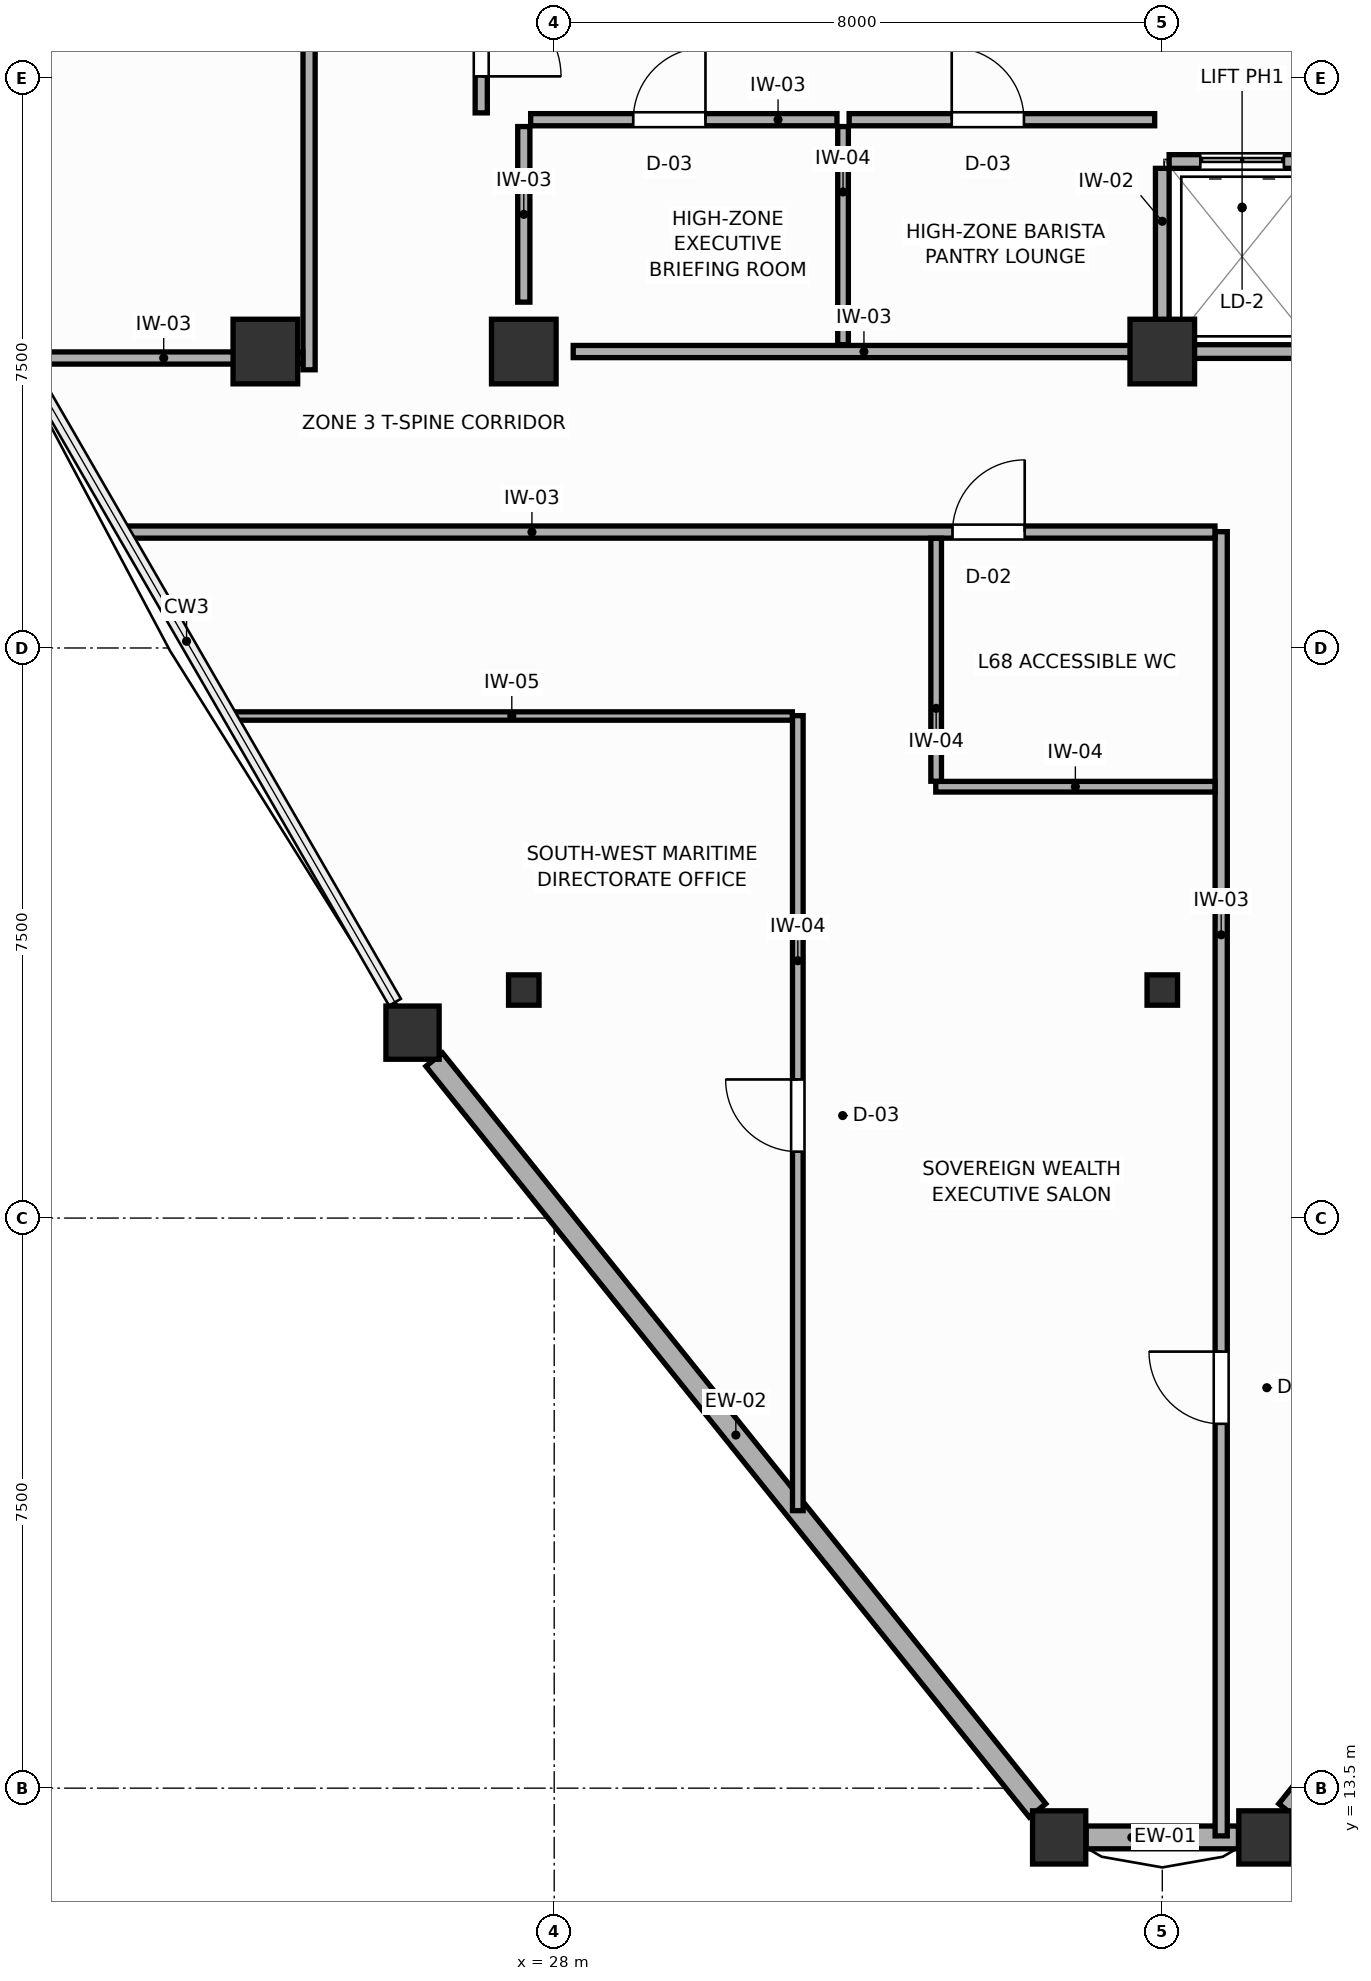
"""IFC4 building model, lengths in metres.
Left out: names, types, materials, properties, quantities, classifications, styles, units other than length and angle.
Written with IfcOpenShell. Run it as: python <this file> out.ifc"""

import sys

from ifc_helpers import new_model, si_unit, direction, frame, frame_2d, origin, origin_2d, place, context, subcontext, project, spatial, rectangle, i_section, extrude, source, transform, mapped, element, fill, save


model = new_model("IFC4")
c1 = context("Model", 3, precision=1e-05, world=origin(), true_north=direction((0.0, 1.0)))
c2 = subcontext(c1, "Body", "Model", "MODEL_VIEW")
j1 = project(units=[si_unit("LENGTHUNIT", "METRE"), si_unit("PLANEANGLEUNIT", "RADIAN")], contexts=[c1])
p1 = place(None, origin())
s1 = spatial("IfcSite", under=j1, at=p1, CompositionType="ELEMENT")
p2 = place(p1, origin())
s2 = spatial("IfcBuilding", under=s1, at=p2, CompositionType="ELEMENT")
p3 = place(p2, frame((0.0, 0.0, 261.0)))
s3 = spatial("IfcBuildingStorey", under=s2, at=p3, CompositionType="ELEMENT", Elevation=261.0)
m1 = source(origin(), c2, "Body", "SweptSolid", [
    extrude(rectangle(XDim=0.85, YDim=0.85, at=origin_2d()), origin(), (0.0, 0.0, 1.0), 3.6),
])
for number, where, z_axis, x_axis in (
    (1, (27.6, 32.4, 0.0), (0.0, 0.0, 1.0), (1.0, 0.0, 0.0)),
    (2, (36.0, 32.4, 0.0), (0.0, 0.0, 1.0), (1.0, 0.0, 0.0)),
    (3, (24.2, 32.4, 0.0), (0.0, 0.0, 1.0), (1.0, 0.0, 0.0)),
):
    element("IfcColumn", number, at=place(p3, frame(where, z_axis=z_axis, x_axis=x_axis)), inside=s3, PredefinedType="COLUMN", context=c2, shape_type="MappedRepresentation", body=[
        mapped(m1, transform((0.0, 0.0, 0.0), scale=1.0)),
    ])
m2 = source(origin(), c2, "Body", "SweptSolid", [
    extrude(i_section(OverallWidth=0.401, OverallDepth=0.399, WebThickness=0.022, FlangeThickness=0.036, FilletRadius=0.015, at=origin_2d()), origin(), (0.0, 0.0, 1.0), 3.6),
])
for number, where, z_axis, x_axis in (
    (4, (27.6, 24.0, 0.0), (0.0, 0.0, 1.0), (1.0, 0.0, 0.0)),
    (5, (36.0, 24.0, 0.0), (0.0, 0.0, 1.0), (1.0, 0.0, 0.0)),
):
    element("IfcColumn", number, at=place(p3, frame(where, z_axis=z_axis, x_axis=x_axis)), inside=s3, PredefinedType="COLUMN", context=c2, shape_type="MappedRepresentation", body=[
        mapped(m2, transform((0.0, 0.0, 0.0), scale=1.0)),
    ])
m3 = source(origin(), c2, "Body", "SweptSolid", [
    extrude(rectangle(XDim=0.7, YDim=0.7, at=origin_2d()), origin(), (0.0, 0.0, 1.0), 3.6),
])
for number, where, z_axis, x_axis in (
    (6, (26.136, 23.439, 0.0), (0.0, 0.0, 1.0), (1.0, 0.0, 0.0)),
    (7, (34.643, 12.852, 0.0), (0.0, 0.0, 1.0), (1.0, 0.0, 0.0)),
    (8, (37.357, 12.852, 0.0), (0.0, 0.0, 1.0), (1.0, 0.0, 0.0)),
):
    element("IfcColumn", number, at=place(p3, frame(where, z_axis=z_axis, x_axis=x_axis)), inside=s3, PredefinedType="COLUMN", context=c2, shape_type="MappedRepresentation", body=[
        mapped(m3, transform((0.0, 0.0, 0.0), scale=1.0)),
    ])
p4 = place(p3, frame((26.421, 23.084, 0.0), z_axis=(0.0, 0.0, 1.0), x_axis=(0.626371247501, -0.77952489396, 0.0)))
e9 = element("IfcWall", 9, at=p4, inside=s3, PredefinedType="SOLIDWALL", context=c2, shape_type="SweptSolid", body=[
    extrude(rectangle(XDim=12.671, YDim=0.28, at=frame_2d((6.336, 0.0))), origin(), (0.0, 0.0, 1.0), 1.88),
])
p5 = place(p3, frame((34.998, 12.852, 0.0), z_axis=(0.0, 0.0, 1.0), x_axis=(1.0, 0.0, 0.0)))
e10 = element("IfcWall", 10, at=p5, inside=s3, PredefinedType="SOLIDWALL", context=c2, shape_type="SweptSolid", body=[
    extrude(rectangle(XDim=2.003, YDim=0.3, at=frame_2d((1.002, 0.0))), origin(), (0.0, 0.0, 1.0), 1.88),
])
p6 = place(p3, frame((37.642, 13.207, 0.0), z_axis=(0.0, 0.0, 1.0), x_axis=(0.626371247501, 0.77952489396, 0.0)))
e11 = element("IfcWall", 11, at=p6, inside=s3, PredefinedType="SOLIDWALL", context=c2, shape_type="SweptSolid", body=[
    extrude(rectangle(XDim=12.671, YDim=0.28, at=frame_2d((6.336, 0.0))), origin(), (0.0, 0.0, 1.0), 1.88),
])
p7 = place(p3, frame((36.09, 34.9, 0.0), z_axis=(0.0, 0.0, 1.0), x_axis=(1.0, 0.0, 0.0)))
e12 = element("IfcWall", 12, at=p7, inside=s3, PredefinedType="PARTITIONING", context=c2, shape_type="SweptSolid", body=[
    extrude(rectangle(XDim=1.92, YDim=0.18, at=frame_2d((0.96, 0.0))), origin(), (0.0, 0.0, 1.0), 3.41),
])
p8 = place(p7, frame((0.41, 0.0, 0.0)))
e13 = element("IfcOpeningElement", 13, at=p8, cuts=e12, PredefinedType="OPENING", context=c2, shape_type="SweptSolid", body=[
    extrude(rectangle(XDim=1.1, YDim=2.1, at=frame_2d((0.55, 1.05))), frame((0.0, 0.1, 0.0), z_axis=(0.0, -1.0, 0.0), x_axis=(1.0, 0.0, 0.0)), (0.0, 0.0, 1.0), 0.2),
])
p9 = place(p3, frame((36.09, 32.4, 0.0), z_axis=(0.0, 0.0, 1.0), x_axis=(1.0, 0.0, 0.0)))
e14 = element("IfcWall", 14, at=p9, inside=s3, PredefinedType="PARTITIONING", context=c2, shape_type="SweptSolid", body=[
    extrude(rectangle(XDim=1.92, YDim=0.18, at=frame_2d((0.96, 0.0))), origin(), (0.0, 0.0, 1.0), 2.17),
])
p10 = place(p3, frame((36.0, 32.49, 0.0), z_axis=(0.0, 0.0, 1.0), x_axis=(0.0, 1.0, 0.0)))
e15 = element("IfcWall", 15, at=p10, inside=s3, PredefinedType="PARTITIONING", context=c2, shape_type="SweptSolid", body=[
    extrude(rectangle(XDim=2.32, YDim=0.18, at=frame_2d((1.16, 0.0))), origin(), (0.0, 0.0, 1.0), 3.41),
])
p11 = place(p3, frame((28.25, 32.4, 0.0), z_axis=(0.0, 0.0, 1.0), x_axis=(1.0, 0.0, 0.0)))
e16 = element("IfcWall", 16, at=p11, inside=s3, PredefinedType="PARTITIONING", context=c2, shape_type="SweptSolid", body=[
    extrude(rectangle(XDim=7.65, YDim=0.16, at=frame_2d((3.825, 0.0))), origin(), (0.0, 0.0, 1.0), 2.17),
])
p12 = place(p3, frame((27.6, 33.05, 0.0), z_axis=(0.0, 0.0, 1.0), x_axis=(0.0, 1.0, 0.0)))
e17 = element("IfcWall", 17, at=p12, inside=s3, PredefinedType="PARTITIONING", context=c2, shape_type="SweptSolid", body=[
    extrude(rectangle(XDim=2.31, YDim=0.16, at=frame_2d((1.155, 0.0))), origin(), (0.0, 0.0, 1.0), 3.41),
])
p13 = place(p3, frame((31.8, 32.49, 0.0), z_axis=(0.0, 0.0, 1.0), x_axis=(0.0, 1.0, 0.0)))
e18 = element("IfcWall", 18, at=p13, inside=s3, PredefinedType="PARTITIONING", context=c2, shape_type="SweptSolid", body=[
    extrude(rectangle(XDim=2.87, YDim=0.14, at=frame_2d((1.435, 0.0))), origin(), (0.0, 0.0, 1.0), 3.41),
])
p14 = place(p3, frame((27.69, 35.45, 0.0), z_axis=(0.0, 0.0, 1.0), x_axis=(1.0, 0.0, 0.0)))
e19 = element("IfcWall", 19, at=p14, inside=s3, PredefinedType="PARTITIONING", context=c2, shape_type="SweptSolid", body=[
    extrude(rectangle(XDim=4.03, YDim=0.16, at=frame_2d((2.015, 0.0))), origin(), (0.0, 0.0, 1.0), 3.41),
])
p15 = place(p14, frame((1.35, 0.0, 0.0)))
e20 = element("IfcOpeningElement", 20, at=p15, cuts=e19, PredefinedType="OPENING", context=c2, shape_type="SweptSolid", body=[
    extrude(rectangle(XDim=0.95, YDim=2.05, at=frame_2d((0.475, 1.025))), frame((0.0, 0.09, 0.0), z_axis=(0.0, -1.0, 0.0), x_axis=(1.0, 0.0, 0.0)), (0.0, 0.0, 1.0), 0.18),
])
p16 = place(p3, frame((31.88, 35.45, 0.0), z_axis=(0.0, 0.0, 1.0), x_axis=(1.0, 0.0, 0.0)))
e21 = element("IfcWall", 21, at=p16, inside=s3, PredefinedType="PARTITIONING", context=c2, shape_type="SweptSolid", body=[
    extrude(rectangle(XDim=4.02, YDim=0.16, at=frame_2d((2.01, 0.0))), origin(), (0.0, 0.0, 1.0), 3.41),
])
p17 = place(p16, frame((1.35, 0.0, 0.0)))
e22 = element("IfcOpeningElement", 22, at=p17, cuts=e21, PredefinedType="OPENING", context=c2, shape_type="SweptSolid", body=[
    extrude(rectangle(XDim=0.95, YDim=2.05, at=frame_2d((0.475, 1.025))), frame((0.0, 0.09, 0.0), z_axis=(0.0, -1.0, 0.0), x_axis=(1.0, 0.0, 0.0)), (0.0, 0.0, 1.0), 0.18),
])
p18 = place(p3, frame((27.04, 35.54, 0.0), z_axis=(0.0, 0.0, 1.0), x_axis=(0.0, 1.0, 0.0)))
e23 = element("IfcWall", 23, at=p18, inside=s3, PredefinedType="PARTITIONING", context=c2, shape_type="SweptSolid", body=[
    extrude(rectangle(XDim=2.11, YDim=0.16, at=frame_2d((1.055, 0.0))), origin(), (0.0, 0.0, 1.0), 3.41),
])
p19 = place(p18, frame((0.48, 0.0, 0.0)))
e24 = element("IfcOpeningElement", 24, at=p19, cuts=e23, PredefinedType="OPENING", context=c2, shape_type="SweptSolid", body=[
    extrude(rectangle(XDim=1.05, YDim=2.1, at=frame_2d((0.525, 1.05))), frame((0.0, 0.09, 0.0), z_axis=(0.0, -1.0, 0.0), x_axis=(1.0, 0.0, 0.0)), (0.0, 0.0, 1.0), 0.18),
])
p20 = place(p3, frame((24.775, 32.16, 0.0), z_axis=(0.0, 0.0, 1.0), x_axis=(0.0, 1.0, 0.0)))
e25 = element("IfcWall", 25, at=p20, inside=s3, PredefinedType="PARTITIONING", context=c2, shape_type="SweptSolid", body=[
    extrude(rectangle(XDim=17.827, YDim=0.16, at=frame_2d((8.914, 0.0))), origin(), (0.0, 0.0, 1.0), 3.41),
])
p21 = place(p20, frame((8.33, 0.0, 0.0)))
e26 = element("IfcOpeningElement", 26, at=p21, cuts=e25, PredefinedType="OPENING", context=c2, shape_type="SweptSolid", body=[
    extrude(rectangle(XDim=0.95, YDim=2.05, at=frame_2d((0.475, 1.025))), frame((0.0, 0.09, 0.0), z_axis=(0.0, -1.0, 0.0), x_axis=(1.0, 0.0, 0.0)), (0.0, 0.0, 1.0), 0.18),
])
p22 = place(p3, frame((36.775, 12.872, 0.0), z_axis=(0.0, 0.0, 1.0), x_axis=(0.0, 1.0, 0.0)))
e27 = element("IfcWall", 27, at=p22, inside=s3, PredefinedType="PARTITIONING", context=c2, shape_type="SweptSolid", body=[
    extrude(rectangle(XDim=17.158, YDim=0.16, at=frame_2d((8.579, 0.0))), origin(), (0.0, 0.0, 1.0), 3.41),
])
p23 = place(p22, frame((5.421, 0.0, 0.0)))
e28 = element("IfcOpeningElement", 28, at=p23, cuts=e27, PredefinedType="OPENING", context=c2, shape_type="SweptSolid", body=[
    extrude(rectangle(XDim=0.95, YDim=2.05, at=frame_2d((0.475, 1.025))), frame((0.0, 0.09, 0.0), z_axis=(0.0, -1.0, 0.0), x_axis=(1.0, 0.0, 0.0)), (0.0, 0.0, 1.0), 0.18),
])
p24 = place(p3, frame((22.354, 30.025, 0.0), z_axis=(0.0, 0.0, 1.0), x_axis=(1.0, 0.0, 0.0)))
e29 = element("IfcWall", 29, at=p24, inside=s3, PredefinedType="PARTITIONING", context=c2, shape_type="SweptSolid", body=[
    extrude(rectangle(XDim=14.339, YDim=0.16, at=frame_2d((7.169, 0.0))), origin(), (0.0, 0.0, 1.0), 3.41),
])
p25 = place(p24, frame((10.886, 0.0, 0.0)))
e30 = element("IfcOpeningElement", 30, at=p25, cuts=e29, PredefinedType="OPENING", context=c2, shape_type="SweptSolid", body=[
    extrude(rectangle(XDim=0.95, YDim=2.05, at=frame_2d((0.475, 1.025))), frame((0.0, 0.09, 0.0), z_axis=(0.0, -1.0, 0.0), x_axis=(1.0, 0.0, 0.0)), (0.0, 0.0, 1.0), 0.18),
])
p26 = place(p3, frame((21.032, 32.315, 0.0), z_axis=(0.0, 0.0, 1.0), x_axis=(1.0, 0.0, 0.0)))
e31 = element("IfcWall", 31, at=p26, inside=s3, PredefinedType="PARTITIONING", context=c2, shape_type="SweptSolid", body=[
    extrude(rectangle(XDim=3.661, YDim=0.16, at=frame_2d((1.831, 0.0))), origin(), (0.0, 0.0, 1.0), 2.17),
])
p27 = place(p3, frame((31.205, 17.151, 0.0), z_axis=(0.0, 0.0, 1.0), x_axis=(0.0, 1.0, 0.0)))
e32 = element("IfcWall", 32, at=p27, inside=s3, PredefinedType="PARTITIONING", context=c2, shape_type="SweptSolid", body=[
    extrude(rectangle(XDim=10.459, YDim=0.14, at=frame_2d((5.229, 0.0))), origin(), (0.0, 0.0, 1.0), 3.41),
])
p28 = place(p27, frame((4.723, 0.0, 0.0)))
e33 = element("IfcOpeningElement", 33, at=p28, cuts=e32, PredefinedType="OPENING", context=c2, shape_type="SweptSolid", body=[
    extrude(rectangle(XDim=0.95, YDim=2.05, at=frame_2d((0.475, 1.025))), frame((0.0, 0.08, 0.0), z_axis=(0.0, -1.0, 0.0), x_axis=(1.0, 0.0, 0.0)), (0.0, 0.0, 1.0), 0.16),
])
p29 = place(p3, frame((23.751, 27.605, 0.0), z_axis=(0.0, 0.0, 1.0), x_axis=(1.0, 0.0, 0.0)))
e34 = element("IfcWall", 34, at=p29, inside=s3, PredefinedType="MOVABLE", context=c2, shape_type="SweptSolid", body=[
    extrude(rectangle(XDim=7.382, YDim=0.11, at=frame_2d((3.691, 0.0))), origin(), (0.0, 0.0, 1.0), 3.41),
])
p30 = place(p3, frame((33.02, 26.675, 0.0), z_axis=(0.0, 0.0, 1.0), x_axis=(1.0, 0.0, 0.0)))
e35 = element("IfcWall", 35, at=p30, inside=s3, PredefinedType="PARTITIONING", context=c2, shape_type="SweptSolid", body=[
    extrude(rectangle(XDim=3.673, YDim=0.14, at=frame_2d((1.836, 0.0))), origin(), (0.0, 0.0, 1.0), 3.41),
])
p31 = place(p3, frame((33.025, 26.747, 0.0), z_axis=(0.0, 0.0, 1.0), x_axis=(0.0, 1.0, 0.0)))
e36 = element("IfcWall", 36, at=p31, inside=s3, PredefinedType="PARTITIONING", context=c2, shape_type="SweptSolid", body=[
    extrude(rectangle(XDim=3.196, YDim=0.14, at=frame_2d((1.598, 0.0))), origin(), (0.0, 0.0, 1.0), 3.41),
])
p32 = place(p8, origin())
e37 = element("IfcDoor", 37, at=p32, inside=s3, OperationType="DOUBLE_DOOR_SLIDING", PredefinedType="DOOR", context=c2, shape_type="SweptSolid", body=[
    extrude(rectangle(XDim=1.1, YDim=2.1, at=frame_2d((0.55, 1.05))), frame((0.0, 0.025, 0.0), z_axis=(0.0, -1.0, 0.0), x_axis=(1.0, 0.0, 0.0)), (0.0, 0.0, 1.0), 0.05),
])
fill(e13, e37)
p33 = place(p15, origin())
e38 = element("IfcDoor", 38, at=p33, inside=s3, OperationType="SINGLE_SWING_RIGHT", PredefinedType="DOOR", context=c2, shape_type="SweptSolid", body=[
    extrude(rectangle(XDim=0.95, YDim=2.05, at=frame_2d((0.475, 1.025))), frame((0.0, 0.025, 0.0), z_axis=(0.0, -1.0, 0.0), x_axis=(1.0, 0.0, 0.0)), (0.0, 0.0, 1.0), 0.05),
])
fill(e20, e38)
p34 = place(p17, origin())
e39 = element("IfcDoor", 39, at=p34, inside=s3, OperationType="SINGLE_SWING_LEFT", PredefinedType="DOOR", context=c2, shape_type="SweptSolid", body=[
    extrude(rectangle(XDim=0.95, YDim=2.05, at=frame_2d((0.475, 1.025))), frame((0.0, 0.025, 0.0), z_axis=(0.0, -1.0, 0.0), x_axis=(1.0, 0.0, 0.0)), (0.0, 0.0, 1.0), 0.05),
])
fill(e22, e39)
p35 = place(p19, frame((1.05, 0.0, 0.0), z_axis=(0.0, 0.0, 1.0), x_axis=(-1.0, 0.0, 0.0)))
e40 = element("IfcDoor", 40, at=p35, inside=s3, OperationType="SINGLE_SWING_RIGHT", PredefinedType="DOOR", context=c2, shape_type="SweptSolid", body=[
    extrude(rectangle(XDim=1.05, YDim=2.1, at=frame_2d((0.525, 1.05))), frame((0.0, 0.025, 0.0), z_axis=(0.0, -1.0, 0.0), x_axis=(1.0, 0.0, 0.0)), (0.0, 0.0, 1.0), 0.05),
])
fill(e24, e40)
p36 = place(p23, origin())
e41 = element("IfcDoor", 41, at=p36, inside=s3, OperationType="SINGLE_SWING_RIGHT", PredefinedType="DOOR", context=c2, shape_type="SweptSolid", body=[
    extrude(rectangle(XDim=0.95, YDim=2.05, at=frame_2d((0.475, 1.025))), frame((0.0, 0.025, 0.0), z_axis=(0.0, -1.0, 0.0), x_axis=(1.0, 0.0, 0.0)), (0.0, 0.0, 1.0), 0.05),
])
fill(e28, e41)
p37 = place(p25, origin())
e42 = element("IfcDoor", 42, at=p37, inside=s3, OperationType="SINGLE_SWING_RIGHT", PredefinedType="DOOR", context=c2, shape_type="SweptSolid", body=[
    extrude(rectangle(XDim=0.95, YDim=2.05, at=frame_2d((0.475, 1.025))), frame((0.0, 0.025, 0.0), z_axis=(0.0, -1.0, 0.0), x_axis=(1.0, 0.0, 0.0)), (0.0, 0.0, 1.0), 0.05),
])
fill(e30, e42)
p38 = place(p28, origin())
e43 = element("IfcDoor", 43, at=p38, inside=s3, OperationType="SINGLE_SWING_RIGHT", PredefinedType="DOOR", context=c2, shape_type="SweptSolid", body=[
    extrude(rectangle(XDim=0.95, YDim=2.05, at=frame_2d((0.475, 1.025))), frame((0.0, 0.025, 0.0), z_axis=(0.0, -1.0, 0.0), x_axis=(1.0, 0.0, 0.0)), (0.0, 0.0, 1.0), 0.05),
])
fill(e33, e43)
save(model, sys.argv[1])
